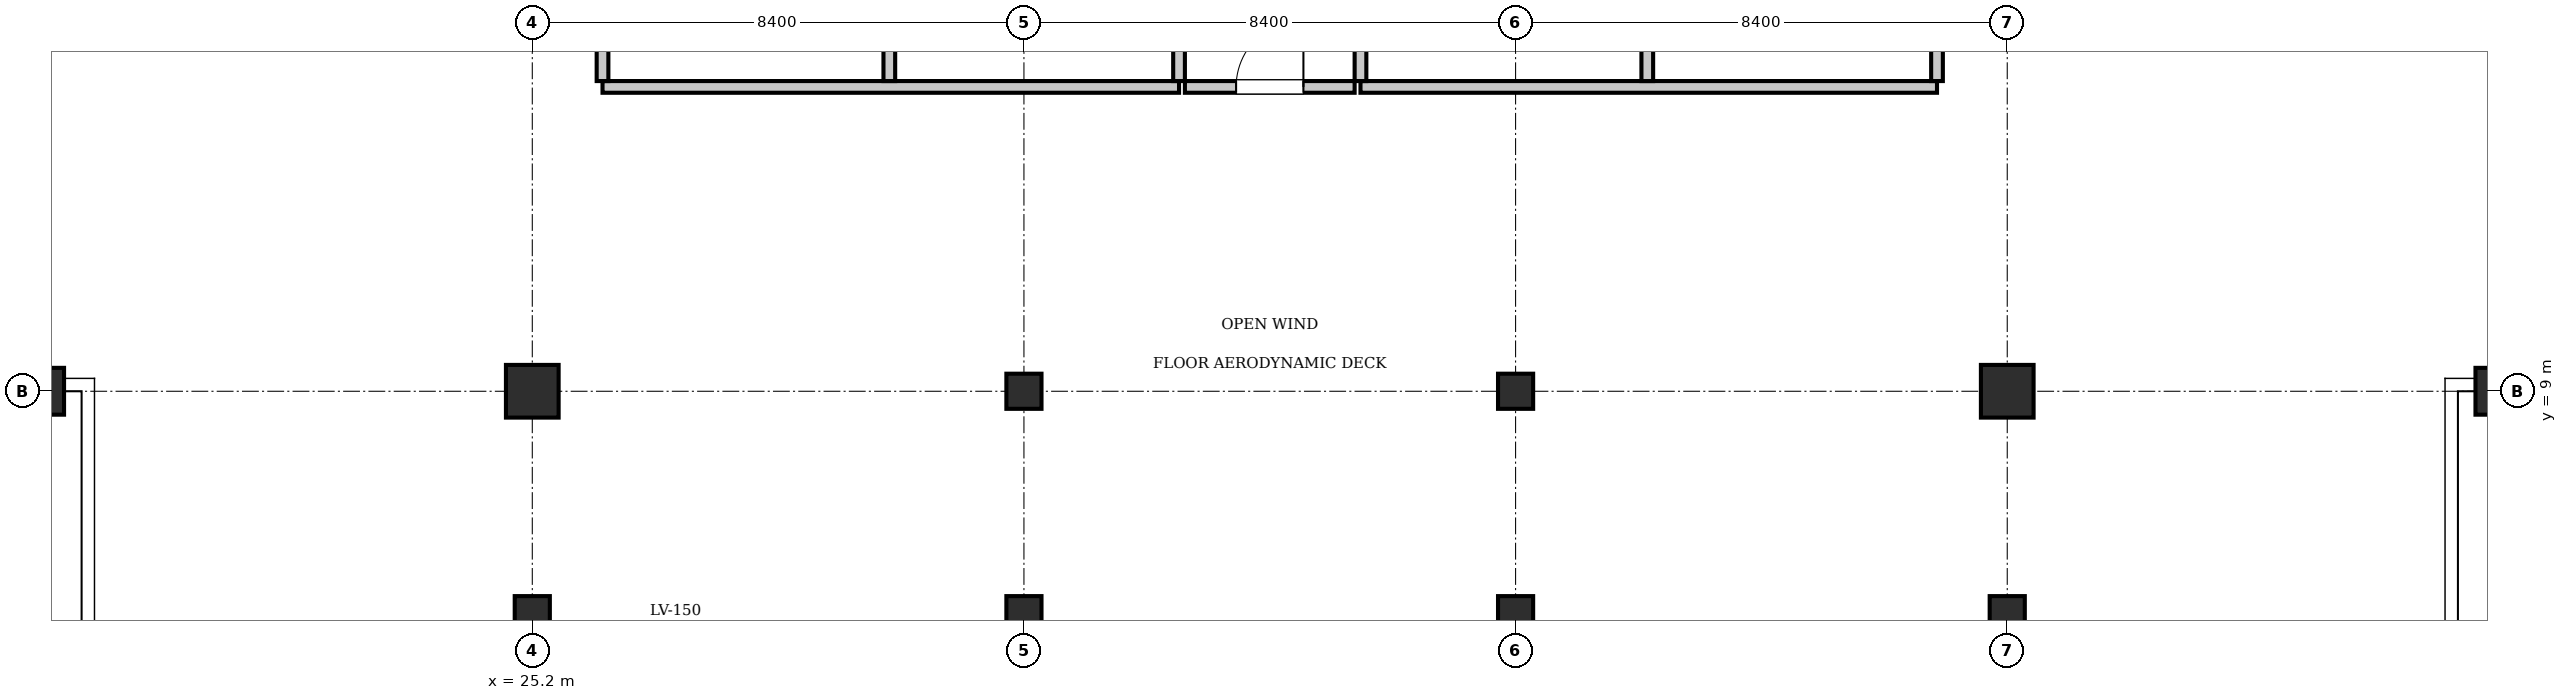
"""IFC4 building model, lengths in metres.
Left out: names, types, materials, properties, quantities, classifications, styles, units other than length and angle.
Written with IfcOpenShell. Run it as: python <this file> out.ifc"""

import sys

from ifc_helpers import new_model, si_unit, direction, frame, frame_2d, origin, origin_2d, place, context, subcontext, project, spatial, rectangle, i_section, extrude, element, fill, save


model = new_model("IFC4")
c1 = context("Model", 3, precision=1e-05, world=origin(), true_north=direction((0.0, 1.0)))
c2 = subcontext(c1, "Body", "Model", "MODEL_VIEW")
j1 = project(units=[si_unit("LENGTHUNIT", "METRE"), si_unit("PLANEANGLEUNIT", "RADIAN")], contexts=[c1])
p1 = place(None, origin())
s1 = spatial("IfcSite", under=j1, at=p1, CompositionType="ELEMENT")
p2 = place(p1, origin())
s2 = spatial("IfcBuilding", under=s1, at=p2, CompositionType="ELEMENT")
p3 = place(p2, frame((0.0, 0.0, 227.5)))
s3 = spatial("IfcBuildingStorey", under=s2, at=p3, CompositionType="ELEMENT", Elevation=227.5)
for number, where, z_axis, x_axis in (
    (1, (25.2, 9.0, 0.0), (0.0, 0.0, 1.0), (1.0, 0.0, 0.0)),
    (2, (50.4, 9.0, 0.0), (0.0, 0.0, 1.0), (1.0, 0.0, 0.0)),
):
    element("IfcColumn", number, at=place(p3, frame(where, z_axis=z_axis, x_axis=x_axis)), inside=s3, PredefinedType="COLUMN", context=c2, shape_type="SweptSolid", body=[
        extrude(rectangle(XDim=0.9, YDim=0.9, at=origin_2d()), origin(), (0.0, 0.0, 1.0), 7.0),
    ])
for number, where, z_axis, x_axis in (
    (3, (33.6, 9.0, 0.0), (0.0, 0.0, 1.0), (1.0, 0.0, 0.0)),
    (4, (42.0, 9.0, 0.0), (0.0, 0.0, 1.0), (1.0, 0.0, 0.0)),
):
    element("IfcColumn", number, at=place(p3, frame(where, z_axis=z_axis, x_axis=x_axis)), inside=s3, PredefinedType="COLUMN", context=c2, shape_type="SweptSolid", body=[
        extrude(i_section(OverallWidth=0.6, OverallDepth=0.6, WebThickness=0.025, FlangeThickness=0.038, at=origin_2d()), origin(), (0.0, 0.0, 1.0), 7.0),
    ])
for number, where, z_axis, x_axis in (
    (5, (16.8, 9.0, 0.0), (0.0, 0.0, 1.0), (1.0, 0.0, 0.0)),
    (6, (58.8, 9.0, 0.0), (0.0, 0.0, 1.0), (1.0, 0.0, 0.0)),
):
    element("IfcColumn", number, at=place(p3, frame(where, z_axis=z_axis, x_axis=x_axis)), inside=s3, PredefinedType="COLUMN", context=c2, shape_type="SweptSolid", body=[
        extrude(rectangle(XDim=0.8, YDim=0.8, at=origin_2d()), origin(), (0.0, 0.0, 1.0), 7.0),
    ])
for number, where, z_axis, x_axis in (
    (7, (25.2, 5.2, 0.0), (0.0, 0.0, 1.0), (1.0, 0.0, 0.0)),
    (8, (33.6, 5.2, 0.0), (0.0, 0.0, 1.0), (1.0, 0.0, 0.0)),
    (9, (42.0, 5.2, 0.0), (0.0, 0.0, 1.0), (1.0, 0.0, 0.0)),
    (10, (50.4, 5.2, 0.0), (0.0, 0.0, 1.0), (1.0, 0.0, 0.0)),
):
    element("IfcColumn", number, at=place(p3, frame(where, z_axis=z_axis, x_axis=x_axis)), inside=s3, PredefinedType="COLUMN", context=c2, shape_type="SweptSolid", body=[
        extrude(i_section(OverallWidth=0.6, OverallDepth=0.6, WebThickness=0.025, FlangeThickness=0.038, at=origin_2d()), origin(), (0.0, 0.0, 1.0), 7.0),
    ])
p4 = place(p3, frame((26.4, 14.2, 0.0), z_axis=(0.0, 0.0, 1.0), x_axis=(1.0, 0.0, 0.0)))
e11 = element("IfcWall", 11, at=p4, inside=s3, PredefinedType="PARTITIONING", context=c2, shape_type="SweptSolid", body=[
    extrude(rectangle(XDim=9.85, YDim=0.2, at=frame_2d((4.925, 0.0))), origin(), (0.0, 0.0, 1.0), 6.76),
])
p5 = place(p3, frame((26.4, 14.3, 0.0), z_axis=(0.0, 0.0, 1.0), x_axis=(0.0, 1.0, 0.0)))
e12 = element("IfcWall", 12, at=p5, inside=s3, PredefinedType="PARTITIONING", context=c2, shape_type="SweptSolid", body=[
    extrude(rectangle(XDim=20.52, YDim=0.2, at=frame_2d((10.26, 0.0))), origin(), (0.0, 0.0, 1.0), 6.76),
])
p6 = place(p3, frame((36.25, 14.3, 0.0), z_axis=(0.0, 0.0, 1.0), x_axis=(0.0, 1.0, 0.0)))
e13 = element("IfcWall", 13, at=p6, inside=s3, PredefinedType="PARTITIONING", context=c2, shape_type="SweptSolid", body=[
    extrude(rectangle(XDim=2.5, YDim=0.2, at=frame_2d((1.25, 0.0))), origin(), (0.0, 0.0, 1.0), 6.76),
])
p7 = place(p6, frame((0.75, 0.0, 0.0)))
e14 = element("IfcOpeningElement", 14, at=p7, cuts=e13, PredefinedType="OPENING", context=c2, shape_type="SweptSolid", body=[
    extrude(rectangle(XDim=0.9, YDim=2.1, at=frame_2d((0.45, 1.05))), frame((0.0, 0.11, 0.0), z_axis=(0.0, -1.0, 0.0), x_axis=(1.0, 0.0, 0.0)), (0.0, 0.0, 1.0), 0.22),
])
p8 = place(p3, frame((31.3, 14.3, 0.0), z_axis=(0.0, 0.0, 1.0), x_axis=(0.0, 1.0, 0.0)))
e15 = element("IfcWall", 15, at=p8, inside=s3, PredefinedType="PARTITIONING", context=c2, shape_type="SweptSolid", body=[
    extrude(rectangle(XDim=2.5, YDim=0.2, at=frame_2d((1.25, 0.0))), origin(), (0.0, 0.0, 1.0), 6.76),
])
p9 = place(p8, frame((0.75, 0.0, 0.0)))
e16 = element("IfcOpeningElement", 16, at=p9, cuts=e15, PredefinedType="OPENING", context=c2, shape_type="SweptSolid", body=[
    extrude(rectangle(XDim=0.9, YDim=2.1, at=frame_2d((0.45, 1.05))), frame((0.0, 0.11, 0.0), z_axis=(0.0, -1.0, 0.0), x_axis=(1.0, 0.0, 0.0)), (0.0, 0.0, 1.0), 0.22),
])
p10 = place(p3, frame((39.35, 14.2, 0.0), z_axis=(0.0, 0.0, 1.0), x_axis=(1.0, 0.0, 0.0)))
e17 = element("IfcWall", 17, at=p10, inside=s3, PredefinedType="PARTITIONING", context=c2, shape_type="SweptSolid", body=[
    extrude(rectangle(XDim=9.85, YDim=0.2, at=frame_2d((4.925, 0.0))), origin(), (0.0, 0.0, 1.0), 6.76),
])
p11 = place(p3, frame((49.2, 14.3, 0.0), z_axis=(0.0, 0.0, 1.0), x_axis=(0.0, 1.0, 0.0)))
e18 = element("IfcWall", 18, at=p11, inside=s3, PredefinedType="PARTITIONING", context=c2, shape_type="SweptSolid", body=[
    extrude(rectangle(XDim=20.52, YDim=0.2, at=frame_2d((10.26, 0.0))), origin(), (0.0, 0.0, 1.0), 6.76),
])
p12 = place(p3, frame((39.35, 14.3, 0.0), z_axis=(0.0, 0.0, 1.0), x_axis=(0.0, 1.0, 0.0)))
e19 = element("IfcWall", 19, at=p12, inside=s3, PredefinedType="PARTITIONING", context=c2, shape_type="SweptSolid", body=[
    extrude(rectangle(XDim=2.5, YDim=0.2, at=frame_2d((1.25, 0.0))), origin(), (0.0, 0.0, 1.0), 6.76),
])
p13 = place(p12, frame((0.75, 0.0, 0.0)))
e20 = element("IfcOpeningElement", 20, at=p13, cuts=e19, PredefinedType="OPENING", context=c2, shape_type="SweptSolid", body=[
    extrude(rectangle(XDim=0.9, YDim=2.1, at=frame_2d((0.45, 1.05))), frame((0.0, 0.11, 0.0), z_axis=(0.0, -1.0, 0.0), x_axis=(1.0, 0.0, 0.0)), (0.0, 0.0, 1.0), 0.22),
])
p14 = place(p3, frame((44.25, 14.3, 0.0), z_axis=(0.0, 0.0, 1.0), x_axis=(0.0, 1.0, 0.0)))
e21 = element("IfcWall", 21, at=p14, inside=s3, PredefinedType="PARTITIONING", context=c2, shape_type="SweptSolid", body=[
    extrude(rectangle(XDim=2.5, YDim=0.2, at=frame_2d((1.25, 0.0))), origin(), (0.0, 0.0, 1.0), 6.76),
])
p15 = place(p14, frame((0.75, 0.0, 0.0)))
e22 = element("IfcOpeningElement", 22, at=p15, cuts=e21, PredefinedType="OPENING", context=c2, shape_type="SweptSolid", body=[
    extrude(rectangle(XDim=0.9, YDim=2.1, at=frame_2d((0.45, 1.05))), frame((0.0, 0.11, 0.0), z_axis=(0.0, -1.0, 0.0), x_axis=(1.0, 0.0, 0.0)), (0.0, 0.0, 1.0), 0.22),
])
p16 = place(p3, frame((36.35, 14.2, 0.0), z_axis=(0.0, 0.0, 1.0), x_axis=(1.0, 0.0, 0.0)))
e23 = element("IfcWall", 23, at=p16, inside=s3, PredefinedType="PARTITIONING", context=c2, shape_type="SweptSolid", body=[
    extrude(rectangle(XDim=2.9, YDim=0.2, at=frame_2d((1.45, 0.0))), origin(), (0.0, 0.0, 1.0), 6.76),
])
p17 = place(p16, frame((0.875, 0.0, 0.0)))
e24 = element("IfcOpeningElement", 24, at=p17, cuts=e23, PredefinedType="OPENING", context=c2, shape_type="SweptSolid", body=[
    extrude(rectangle(XDim=1.15, YDim=2.15, at=frame_2d((0.575, 1.075))), frame((0.0, 0.11, 0.0), z_axis=(0.0, -1.0, 0.0), x_axis=(1.0, 0.0, 0.0)), (0.0, 0.0, 1.0), 0.22),
])
p18 = place(p17, origin())
e25 = element("IfcDoor", 25, at=p18, inside=s3, OperationType="SINGLE_SWING_RIGHT", PredefinedType="DOOR", context=c2, shape_type="SweptSolid", body=[
    extrude(rectangle(XDim=1.15, YDim=2.15, at=frame_2d((0.575, 1.075))), frame((0.0, 0.025, 0.0), z_axis=(0.0, -1.0, 0.0), x_axis=(1.0, 0.0, 0.0)), (0.0, 0.0, 1.0), 0.05),
])
fill(e24, e25)
save(model, sys.argv[1])
